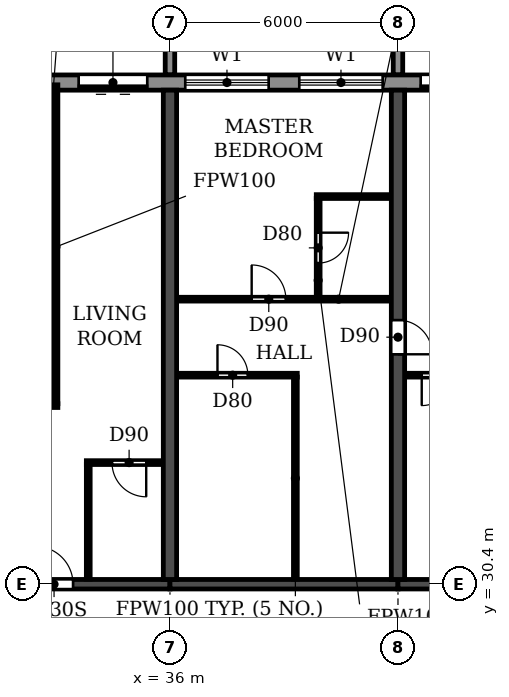
"""IFC4 building model, lengths in metres.
Left out: names, types, materials, properties, quantities, classifications, styles, units other than length and angle.
Written with IfcOpenShell. Run it as: python <this file> out.ifc"""

import sys

from ifc_helpers import new_model, si_unit, direction, frame, frame_2d, origin, place, context, subcontext, project, spatial, polyline, rectangle, outline, extrude, source, transform, mapped, element, fill, save


model = new_model("IFC4")
c1 = context("Model", 3, precision=1e-05, world=origin(), true_north=direction((0.0, 1.0)))
c2 = subcontext(c1, "Body", "Model", "MODEL_VIEW")
j1 = project(units=[si_unit("LENGTHUNIT", "METRE"), si_unit("PLANEANGLEUNIT", "RADIAN")], contexts=[c1])
p1 = place(None, origin())
s1 = spatial("IfcSite", under=j1, at=p1, CompositionType="ELEMENT")
p2 = place(p1, origin())
s2 = spatial("IfcBuilding", under=s1, at=p2, CompositionType="ELEMENT")
p3 = place(p2, frame((0.0, 0.0, 72.9)))
s3 = spatial("IfcBuildingStorey", under=s2, at=p3, CompositionType="ELEMENT", Elevation=72.9)
p4 = place(p3, frame((36.0, 30.525, 0.0), z_axis=(0.0, 0.0, 1.0), x_axis=(0.0, 1.0, 0.0)))
e1 = element("IfcWall", 1, at=p4, inside=s3, PredefinedType="SHEAR", context=c2, shape_type="SweptSolid", body=[
    extrude(rectangle(XDim=12.875, YDim=0.35, at=frame_2d((6.438, 0.0))), origin(), (0.0, 0.0, 1.0), 3.06),
])
p5 = place(p3, frame((42.0, 30.525, 0.0), z_axis=(0.0, 0.0, 1.0), x_axis=(0.0, 1.0, 0.0)))
e2 = element("IfcWall", 2, at=p5, inside=s3, PredefinedType="SHEAR", context=c2, shape_type="SweptSolid", body=[
    extrude(rectangle(XDim=12.875, YDim=0.35, at=frame_2d((6.438, 0.0))), origin(), (0.0, 0.0, 1.0), 3.06),
])
p6 = place(p5, frame((5.925, 0.0, 0.0)))
e3 = element("IfcOpeningElement", 3, at=p6, cuts=e2, PredefinedType="OPENING", context=c2, shape_type="SweptSolid", body=[
    extrude(rectangle(XDim=0.9, YDim=2.1, at=frame_2d((0.45, 1.05))), frame((0.0, 0.185, 0.0), z_axis=(0.0, -1.0, 0.0), x_axis=(1.0, 0.0, 0.0)), (0.0, 0.0, 1.0), 0.37),
])
p7 = place(p3, frame((30.0, 30.4, 0.0), z_axis=(0.0, 0.0, 1.0), x_axis=(1.0, 0.0, 0.0)))
e4 = element("IfcWall", 4, at=p7, inside=s3, PredefinedType="SHEAR", context=c2, shape_type="SweptSolid", body=[
    extrude(rectangle(XDim=6.0, YDim=0.25, at=frame_2d((3.0, 0.0))), origin(), (0.0, 0.0, 1.0), 2.46),
])
p8 = place(p7, frame((2.45, 0.0, 0.0)))
e5 = element("IfcOpeningElement", 5, at=p8, cuts=e4, PredefinedType="OPENING", context=c2, shape_type="SweptSolid", body=[
    extrude(rectangle(XDim=1.0, YDim=2.1, at=frame_2d((0.5, 1.05))), frame((0.0, 0.135, 0.0), z_axis=(0.0, -1.0, 0.0), x_axis=(1.0, 0.0, 0.0)), (0.0, 0.0, 1.0), 0.27),
])
p9 = place(p3, frame((36.0, 30.4, 0.0), z_axis=(0.0, 0.0, 1.0), x_axis=(1.0, 0.0, 0.0)))
e6 = element("IfcWall", 6, at=p9, inside=s3, PredefinedType="SHEAR", context=c2, shape_type="SweptSolid", body=[
    extrude(rectangle(XDim=6.0, YDim=0.25, at=frame_2d((3.0, 0.0))), origin(), (0.0, 0.0, 1.0), 2.46),
])
p10 = place(p3, frame((42.0, 30.4, 0.0), z_axis=(0.0, 0.0, 1.0), x_axis=(1.0, 0.0, 0.0)))
e7 = element("IfcWall", 7, at=p10, inside=s3, PredefinedType="SHEAR", context=c2, shape_type="SweptSolid", body=[
    extrude(rectangle(XDim=6.0, YDim=0.25, at=frame_2d((3.0, 0.0))), origin(), (0.0, 0.0, 1.0), 2.46),
])
p11 = place(p10, frame((2.45, 0.0, 0.0)))
e8 = element("IfcOpeningElement", 8, at=p11, cuts=e7, PredefinedType="OPENING", context=c2, shape_type="SweptSolid", body=[
    extrude(rectangle(XDim=1.0, YDim=2.1, at=frame_2d((0.5, 1.05))), frame((0.0, 0.135, 0.0), z_axis=(0.0, -1.0, 0.0), x_axis=(1.0, 0.0, 0.0)), (0.0, 0.0, 1.0), 0.27),
])
p12 = place(p3, frame((91.317, 43.6, 0.0), z_axis=(0.0, 0.0, 1.0), x_axis=(-1.0, 0.0, 0.0)))
e9 = element("IfcWall", 9, at=p12, inside=s3, PredefinedType="STANDARD", context=c2, shape_type="SweptSolid", body=[
    extrude(rectangle(XDim=80.634, YDim=0.4, at=frame_2d((40.317, 0.0))), origin(), (0.0, 0.0, 1.0), 3.06),
])
p13 = place(p12, frame((76.717, 0.0, 0.9)))
e10 = element("IfcOpeningElement", 10, at=p13, cuts=e9, PredefinedType="OPENING", context=c2, shape_type="SweptSolid", body=[
    extrude(rectangle(XDim=2.2, YDim=1.5, at=frame_2d((1.1, 0.75))), frame((0.0, 0.21, 0.0), z_axis=(0.0, -1.0, 0.0), x_axis=(1.0, 0.0, 0.0)), (0.0, 0.0, 1.0), 0.42),
])
p14 = place(p12, frame((73.917, 0.0, 0.0)))
e11 = element("IfcOpeningElement", 11, at=p14, cuts=e9, PredefinedType="OPENING", context=c2, shape_type="SweptSolid", body=[
    extrude(rectangle(XDim=1.8, YDim=2.4, at=frame_2d((0.9, 1.2))), frame((0.0, 0.21, 0.0), z_axis=(0.0, -1.0, 0.0), x_axis=(1.0, 0.0, 0.0)), (0.0, 0.0, 1.0), 0.42),
])
p15 = place(p12, frame((70.917, 0.0, 0.0)))
e12 = element("IfcOpeningElement", 12, at=p15, cuts=e9, PredefinedType="OPENING", context=c2, shape_type="SweptSolid", body=[
    extrude(rectangle(XDim=1.8, YDim=2.4, at=frame_2d((0.9, 1.2))), frame((0.0, 0.21, 0.0), z_axis=(0.0, -1.0, 0.0), x_axis=(1.0, 0.0, 0.0)), (0.0, 0.0, 1.0), 0.42),
])
p16 = place(p12, frame((67.717, 0.0, 0.9)))
e13 = element("IfcOpeningElement", 13, at=p16, cuts=e9, PredefinedType="OPENING", context=c2, shape_type="SweptSolid", body=[
    extrude(rectangle(XDim=2.2, YDim=1.5, at=frame_2d((1.1, 0.75))), frame((0.0, 0.21, 0.0), z_axis=(0.0, -1.0, 0.0), x_axis=(1.0, 0.0, 0.0)), (0.0, 0.0, 1.0), 0.42),
])
p17 = place(p12, frame((64.717, 0.0, 0.9)))
e14 = element("IfcOpeningElement", 14, at=p17, cuts=e9, PredefinedType="OPENING", context=c2, shape_type="SweptSolid", body=[
    extrude(rectangle(XDim=2.2, YDim=1.5, at=frame_2d((1.1, 0.75))), frame((0.0, 0.21, 0.0), z_axis=(0.0, -1.0, 0.0), x_axis=(1.0, 0.0, 0.0)), (0.0, 0.0, 1.0), 0.42),
])
p18 = place(p12, frame((61.917, 0.0, 0.0)))
e15 = element("IfcOpeningElement", 15, at=p18, cuts=e9, PredefinedType="OPENING", context=c2, shape_type="SweptSolid", body=[
    extrude(rectangle(XDim=1.8, YDim=2.4, at=frame_2d((0.9, 1.2))), frame((0.0, 0.21, 0.0), z_axis=(0.0, -1.0, 0.0), x_axis=(1.0, 0.0, 0.0)), (0.0, 0.0, 1.0), 0.42),
])
p19 = place(p12, frame((58.717, 0.0, 0.9)))
e16 = element("IfcOpeningElement", 16, at=p19, cuts=e9, PredefinedType="OPENING", context=c2, shape_type="SweptSolid", body=[
    extrude(rectangle(XDim=2.2, YDim=1.5, at=frame_2d((1.1, 0.75))), frame((0.0, 0.21, 0.0), z_axis=(0.0, -1.0, 0.0), x_axis=(1.0, 0.0, 0.0)), (0.0, 0.0, 1.0), 0.42),
])
p20 = place(p12, frame((55.917, 0.0, 0.0)))
e17 = element("IfcOpeningElement", 17, at=p20, cuts=e9, PredefinedType="OPENING", context=c2, shape_type="SweptSolid", body=[
    extrude(rectangle(XDim=1.8, YDim=2.4, at=frame_2d((0.9, 1.2))), frame((0.0, 0.21, 0.0), z_axis=(0.0, -1.0, 0.0), x_axis=(1.0, 0.0, 0.0)), (0.0, 0.0, 1.0), 0.42),
])
p21 = place(p12, frame((52.717, 0.0, 0.9)))
e18 = element("IfcOpeningElement", 18, at=p21, cuts=e9, PredefinedType="OPENING", context=c2, shape_type="SweptSolid", body=[
    extrude(rectangle(XDim=2.2, YDim=1.5, at=frame_2d((1.1, 0.75))), frame((0.0, 0.21, 0.0), z_axis=(0.0, -1.0, 0.0), x_axis=(1.0, 0.0, 0.0)), (0.0, 0.0, 1.0), 0.42),
])
p22 = place(p12, frame((49.717, 0.0, 0.9)))
e19 = element("IfcOpeningElement", 19, at=p22, cuts=e9, PredefinedType="OPENING", context=c2, shape_type="SweptSolid", body=[
    extrude(rectangle(XDim=2.2, YDim=1.5, at=frame_2d((1.1, 0.75))), frame((0.0, 0.21, 0.0), z_axis=(0.0, -1.0, 0.0), x_axis=(1.0, 0.0, 0.0)), (0.0, 0.0, 1.0), 0.42),
])
p23 = place(p12, frame((46.917, 0.0, 0.0)))
e20 = element("IfcOpeningElement", 20, at=p23, cuts=e9, PredefinedType="OPENING", context=c2, shape_type="SweptSolid", body=[
    extrude(rectangle(XDim=1.8, YDim=2.4, at=frame_2d((0.9, 1.2))), frame((0.0, 0.21, 0.0), z_axis=(0.0, -1.0, 0.0), x_axis=(1.0, 0.0, 0.0)), (0.0, 0.0, 1.0), 0.42),
])
p24 = place(p12, frame((43.717, 0.0, 0.9)))
e21 = element("IfcOpeningElement", 21, at=p24, cuts=e9, PredefinedType="OPENING", context=c2, shape_type="SweptSolid", body=[
    extrude(rectangle(XDim=2.2, YDim=1.5, at=frame_2d((1.1, 0.75))), frame((0.0, 0.21, 0.0), z_axis=(0.0, -1.0, 0.0), x_axis=(1.0, 0.0, 0.0)), (0.0, 0.0, 1.0), 0.42),
])
p25 = place(p12, frame((40.717, 0.0, 0.9)))
e22 = element("IfcOpeningElement", 22, at=p25, cuts=e9, PredefinedType="OPENING", context=c2, shape_type="SweptSolid", body=[
    extrude(rectangle(XDim=2.2, YDim=1.5, at=frame_2d((1.1, 0.75))), frame((0.0, 0.21, 0.0), z_axis=(0.0, -1.0, 0.0), x_axis=(1.0, 0.0, 0.0)), (0.0, 0.0, 1.0), 0.42),
])
p26 = place(p12, frame((37.917, 0.0, 0.0)))
e23 = element("IfcOpeningElement", 23, at=p26, cuts=e9, PredefinedType="OPENING", context=c2, shape_type="SweptSolid", body=[
    extrude(rectangle(XDim=1.8, YDim=2.4, at=frame_2d((0.9, 1.2))), frame((0.0, 0.21, 0.0), z_axis=(0.0, -1.0, 0.0), x_axis=(1.0, 0.0, 0.0)), (0.0, 0.0, 1.0), 0.42),
])
p27 = place(p12, frame((34.717, 0.0, 0.9)))
e24 = element("IfcOpeningElement", 24, at=p27, cuts=e9, PredefinedType="OPENING", context=c2, shape_type="SweptSolid", body=[
    extrude(rectangle(XDim=2.2, YDim=1.5, at=frame_2d((1.1, 0.75))), frame((0.0, 0.21, 0.0), z_axis=(0.0, -1.0, 0.0), x_axis=(1.0, 0.0, 0.0)), (0.0, 0.0, 1.0), 0.42),
])
p28 = place(p12, frame((31.917, 0.0, 0.0)))
e25 = element("IfcOpeningElement", 25, at=p28, cuts=e9, PredefinedType="OPENING", context=c2, shape_type="SweptSolid", body=[
    extrude(rectangle(XDim=1.8, YDim=2.4, at=frame_2d((0.9, 1.2))), frame((0.0, 0.21, 0.0), z_axis=(0.0, -1.0, 0.0), x_axis=(1.0, 0.0, 0.0)), (0.0, 0.0, 1.0), 0.42),
])
p29 = place(p12, frame((28.717, 0.0, 0.9)))
e26 = element("IfcOpeningElement", 26, at=p29, cuts=e9, PredefinedType="OPENING", context=c2, shape_type="SweptSolid", body=[
    extrude(rectangle(XDim=2.2, YDim=1.5, at=frame_2d((1.1, 0.75))), frame((0.0, 0.21, 0.0), z_axis=(0.0, -1.0, 0.0), x_axis=(1.0, 0.0, 0.0)), (0.0, 0.0, 1.0), 0.42),
])
p30 = place(p12, frame((25.717, 0.0, 0.9)))
e27 = element("IfcOpeningElement", 27, at=p30, cuts=e9, PredefinedType="OPENING", context=c2, shape_type="SweptSolid", body=[
    extrude(rectangle(XDim=2.2, YDim=1.5, at=frame_2d((1.1, 0.75))), frame((0.0, 0.21, 0.0), z_axis=(0.0, -1.0, 0.0), x_axis=(1.0, 0.0, 0.0)), (0.0, 0.0, 1.0), 0.42),
])
p31 = place(p12, frame((22.717, 0.0, 0.9)))
e28 = element("IfcOpeningElement", 28, at=p31, cuts=e9, PredefinedType="OPENING", context=c2, shape_type="SweptSolid", body=[
    extrude(rectangle(XDim=2.2, YDim=1.5, at=frame_2d((1.1, 0.75))), frame((0.0, 0.21, 0.0), z_axis=(0.0, -1.0, 0.0), x_axis=(1.0, 0.0, 0.0)), (0.0, 0.0, 1.0), 0.42),
])
p32 = place(p12, frame((19.917, 0.0, 0.0)))
e29 = element("IfcOpeningElement", 29, at=p32, cuts=e9, PredefinedType="OPENING", context=c2, shape_type="SweptSolid", body=[
    extrude(rectangle(XDim=1.8, YDim=2.4, at=frame_2d((0.9, 1.2))), frame((0.0, 0.21, 0.0), z_axis=(0.0, -1.0, 0.0), x_axis=(1.0, 0.0, 0.0)), (0.0, 0.0, 1.0), 0.42),
])
p33 = place(p12, frame((16.717, 0.0, 0.9)))
e30 = element("IfcOpeningElement", 30, at=p33, cuts=e9, PredefinedType="OPENING", context=c2, shape_type="SweptSolid", body=[
    extrude(rectangle(XDim=2.2, YDim=1.5, at=frame_2d((1.1, 0.75))), frame((0.0, 0.21, 0.0), z_axis=(0.0, -1.0, 0.0), x_axis=(1.0, 0.0, 0.0)), (0.0, 0.0, 1.0), 0.42),
])
p34 = place(p12, frame((13.717, 0.0, 0.9)))
e31 = element("IfcOpeningElement", 31, at=p34, cuts=e9, PredefinedType="OPENING", context=c2, shape_type="SweptSolid", body=[
    extrude(rectangle(XDim=2.2, YDim=1.5, at=frame_2d((1.1, 0.75))), frame((0.0, 0.21, 0.0), z_axis=(0.0, -1.0, 0.0), x_axis=(1.0, 0.0, 0.0)), (0.0, 0.0, 1.0), 0.42),
])
p35 = place(p12, frame((10.717, 0.0, 0.9)))
e32 = element("IfcOpeningElement", 32, at=p35, cuts=e9, PredefinedType="OPENING", context=c2, shape_type="SweptSolid", body=[
    extrude(rectangle(XDim=2.2, YDim=1.5, at=frame_2d((1.1, 0.75))), frame((0.0, 0.21, 0.0), z_axis=(0.0, -1.0, 0.0), x_axis=(1.0, 0.0, 0.0)), (0.0, 0.0, 1.0), 0.42),
])
p36 = place(p12, frame((7.917, 0.0, 0.0)))
e33 = element("IfcOpeningElement", 33, at=p36, cuts=e9, PredefinedType="OPENING", context=c2, shape_type="SweptSolid", body=[
    extrude(rectangle(XDim=1.8, YDim=2.4, at=frame_2d((0.9, 1.2))), frame((0.0, 0.21, 0.0), z_axis=(0.0, -1.0, 0.0), x_axis=(1.0, 0.0, 0.0)), (0.0, 0.0, 1.0), 0.42),
])
p37 = place(p12, frame((4.717, 0.0, 0.9)))
e34 = element("IfcOpeningElement", 34, at=p37, cuts=e9, PredefinedType="OPENING", context=c2, shape_type="SweptSolid", body=[
    extrude(rectangle(XDim=2.2, YDim=1.5, at=frame_2d((1.1, 0.75))), frame((0.0, 0.21, 0.0), z_axis=(0.0, -1.0, 0.0), x_axis=(1.0, 0.0, 0.0)), (0.0, 0.0, 1.0), 0.42),
])
p38 = place(p12, frame((1.917, 0.0, 0.0)))
e35 = element("IfcOpeningElement", 35, at=p38, cuts=e9, PredefinedType="OPENING", context=c2, shape_type="SweptSolid", body=[
    extrude(rectangle(XDim=1.8, YDim=2.4, at=frame_2d((0.9, 1.2))), frame((0.0, 0.21, 0.0), z_axis=(0.0, -1.0, 0.0), x_axis=(1.0, 0.0, 0.0)), (0.0, 0.0, 1.0), 0.42),
])
m1 = source(origin(), c2, "Body", "SweptSolid", [
    extrude(outline(polyline([(0.0, 0.0), (0.25, 0.0), (0.25, 3.1), (0.0, 3.1), (0.0, 0.0)])), origin(), (0.0, 0.0, 1.0), 3.1),
])
for number, where in (
    (36, (35.875, 43.8, 0.0)),
    (37, (41.875, 43.8, 0.0)),
):
    element("IfcWall", number, at=place(p3, frame(where)), inside=s3, PredefinedType="STANDARD", context=c2, shape_type="MappedRepresentation", body=[
        mapped(m1, transform((0.0, 0.0, 0.0))),
    ])
p39 = place(p3, frame((33.8, 33.6, 0.0), z_axis=(0.0, 0.0, 1.0), x_axis=(1.0, 0.0, 0.0)))
e38 = element("IfcWall", 38, at=p39, inside=s3, PredefinedType="PARTITIONING", context=c2, shape_type="SweptSolid", body=[
    extrude(rectangle(XDim=2.015, YDim=0.1, at=frame_2d((1.007, 0.0))), origin(), (0.0, 0.0, 1.0), 3.06),
])
p40 = place(p39, frame((0.675, 0.0, 0.0)))
e39 = element("IfcOpeningElement", 39, at=p40, cuts=e38, PredefinedType="OPENING", context=c2, shape_type="SweptSolid", body=[
    extrude(rectangle(XDim=0.9, YDim=2.1, at=frame_2d((0.45, 1.05))), frame((0.0, 0.06, 0.0), z_axis=(0.0, -1.0, 0.0), x_axis=(1.0, 0.0, 0.0)), (0.0, 0.0, 1.0), 0.12),
])
p41 = place(p3, frame((30.185, 35.1, 0.0), z_axis=(0.0, 0.0, 1.0), x_axis=(1.0, 0.0, 0.0)))
e40 = element("IfcWall", 40, at=p41, inside=s3, PredefinedType="PARTITIONING", context=c2, shape_type="SweptSolid", body=[
    extrude(rectangle(XDim=2.865, YDim=0.1, at=frame_2d((1.433, 0.0))), origin(), (0.0, 0.0, 1.0), 3.06),
])
p42 = place(p41, frame((0.315, 0.0, 0.0)))
e41 = element("IfcOpeningElement", 41, at=p42, cuts=e40, PredefinedType="OPENING", context=c2, shape_type="SweptSolid", body=[
    extrude(rectangle(XDim=0.9, YDim=2.1, at=frame_2d((0.45, 1.05))), frame((0.0, 0.06, 0.0), z_axis=(0.0, -1.0, 0.0), x_axis=(1.0, 0.0, 0.0)), (0.0, 0.0, 1.0), 0.12),
])
p43 = place(p3, frame((36.185, 35.9, 0.0), z_axis=(0.0, 0.0, 1.0), x_axis=(1.0, 0.0, 0.0)))
e42 = element("IfcWall", 42, at=p43, inside=s3, PredefinedType="PARTITIONING", context=c2, shape_type="SweptSolid", body=[
    extrude(rectangle(XDim=3.165, YDim=0.1, at=frame_2d((1.583, 0.0))), origin(), (0.0, 0.0, 1.0), 3.06),
])
p44 = place(p43, frame((1.065, 0.0, 0.0)))
e43 = element("IfcOpeningElement", 43, at=p44, cuts=e42, PredefinedType="OPENING", context=c2, shape_type="SweptSolid", body=[
    extrude(rectangle(XDim=0.8, YDim=2.1, at=frame_2d((0.4, 1.05))), frame((0.0, 0.06, 0.0), z_axis=(0.0, -1.0, 0.0), x_axis=(1.0, 0.0, 0.0)), (0.0, 0.0, 1.0), 0.12),
])
p45 = place(p3, frame((42.185, 35.9, 0.0), z_axis=(0.0, 0.0, 1.0), x_axis=(1.0, 0.0, 0.0)))
e44 = element("IfcWall", 44, at=p45, inside=s3, PredefinedType="PARTITIONING", context=c2, shape_type="SweptSolid", body=[
    extrude(rectangle(XDim=1.915, YDim=0.1, at=frame_2d((0.958, 0.0))), origin(), (0.0, 0.0, 1.0), 3.06),
])
p46 = place(p45, frame((0.44, 0.0, 0.0)))
e45 = element("IfcOpeningElement", 45, at=p46, cuts=e44, PredefinedType="OPENING", context=c2, shape_type="SweptSolid", body=[
    extrude(rectangle(XDim=0.8, YDim=2.1, at=frame_2d((0.4, 1.05))), frame((0.0, 0.06, 0.0), z_axis=(0.0, -1.0, 0.0), x_axis=(1.0, 0.0, 0.0)), (0.0, 0.0, 1.0), 0.12),
])
p47 = place(p3, frame((36.185, 37.9, 0.0), z_axis=(0.0, 0.0, 1.0), x_axis=(1.0, 0.0, 0.0)))
e46 = element("IfcWall", 46, at=p47, inside=s3, PredefinedType="PARTITIONING", context=c2, shape_type="SweptSolid", body=[
    extrude(rectangle(XDim=5.63, YDim=0.1, at=frame_2d((2.815, 0.0))), origin(), (0.0, 0.0, 1.0), 3.06),
])
p48 = place(p47, frame((1.965, 0.0, 0.0)))
e47 = element("IfcOpeningElement", 47, at=p48, cuts=e46, PredefinedType="OPENING", context=c2, shape_type="SweptSolid", body=[
    extrude(rectangle(XDim=0.9, YDim=2.1, at=frame_2d((0.45, 1.05))), frame((0.0, 0.06, 0.0), z_axis=(0.0, -1.0, 0.0), x_axis=(1.0, 0.0, 0.0)), (0.0, 0.0, 1.0), 0.12),
])
p49 = place(p3, frame((39.85, 40.6, 0.0), z_axis=(0.0, 0.0, 1.0), x_axis=(1.0, 0.0, 0.0)))
e48 = element("IfcWall", 48, at=p49, inside=s3, PredefinedType="PARTITIONING", context=c2, shape_type="SweptSolid", body=[
    extrude(rectangle(XDim=1.965, YDim=0.1, at=frame_2d((0.982, 0.0))), origin(), (0.0, 0.0, 1.0), 3.06),
])
p50 = place(p3, frame((33.0, 35.15, 0.0), z_axis=(0.0, 0.0, 1.0), x_axis=(0.0, 1.0, 0.0)))
e49 = element("IfcWall", 49, at=p50, inside=s3, PredefinedType="PARTITIONING", context=c2, shape_type="SweptSolid", body=[
    extrude(rectangle(XDim=8.39, YDim=0.1, at=frame_2d((4.195, 0.0))), origin(), (0.0, 0.0, 1.0), 3.06),
])
p51 = place(p3, frame((33.85, 30.535, 0.0), z_axis=(0.0, 0.0, 1.0), x_axis=(0.0, 1.0, 0.0)))
e50 = element("IfcWall", 50, at=p51, inside=s3, PredefinedType="PARTITIONING", context=c2, shape_type="SweptSolid", body=[
    extrude(rectangle(XDim=3.015, YDim=0.1, at=frame_2d((1.508, 0.0))), origin(), (0.0, 0.0, 1.0), 3.06),
])
p52 = place(p3, frame((39.3, 30.535, 0.0), z_axis=(0.0, 0.0, 1.0), x_axis=(0.0, 1.0, 0.0)))
e51 = element("IfcWall", 51, at=p52, inside=s3, PredefinedType="PARTITIONING", context=c2, shape_type="SweptSolid", body=[
    extrude(rectangle(XDim=5.315, YDim=0.1, at=frame_2d((2.658, 0.0))), origin(), (0.0, 0.0, 1.0), 3.06),
])
p53 = place(p3, frame((39.9, 37.95, 0.0), z_axis=(0.0, 0.0, 1.0), x_axis=(0.0, 1.0, 0.0)))
e52 = element("IfcWall", 52, at=p53, inside=s3, PredefinedType="PARTITIONING", context=c2, shape_type="SweptSolid", body=[
    extrude(rectangle(XDim=2.6, YDim=0.1, at=frame_2d((1.3, 0.0))), origin(), (0.0, 0.0, 1.0), 3.06),
])
p54 = place(p53, frame((0.9, 0.0, 0.0)))
e53 = element("IfcOpeningElement", 53, at=p54, cuts=e52, PredefinedType="OPENING", context=c2, shape_type="SweptSolid", body=[
    extrude(rectangle(XDim=0.8, YDim=2.1, at=frame_2d((0.4, 1.05))), frame((0.0, 0.06, 0.0), z_axis=(0.0, -1.0, 0.0), x_axis=(1.0, 0.0, 0.0)), (0.0, 0.0, 1.0), 0.12),
])
p55 = place(p20, origin())
e54 = element("IfcDoor", 54, at=p55, inside=s3, OperationType="DOUBLE_DOOR_SLIDING", PredefinedType="DOOR", context=c2, shape_type="SweptSolid", body=[
    extrude(rectangle(XDim=1.8, YDim=2.4, at=frame_2d((0.9, 1.2))), frame((0.0, 0.025, 0.0), z_axis=(0.0, -1.0, 0.0), x_axis=(1.0, 0.0, 0.0)), (0.0, 0.0, 1.0), 0.05),
])
fill(e17, e54)
p56 = place(p21, origin())
e55 = element("IfcWindow", 55, at=p56, inside=s3, PartitioningType="DOUBLE_PANEL_HORIZONTAL", PredefinedType="WINDOW", context=c2, shape_type="SweptSolid", body=[
    extrude(rectangle(XDim=2.2, YDim=1.5, at=frame_2d((1.1, 0.75))), frame((0.0, 0.03, 0.0), z_axis=(0.0, -1.0, 0.0), x_axis=(1.0, 0.0, 0.0)), (0.0, 0.0, 1.0), 0.06),
])
fill(e18, e55)
p57 = place(p22, origin())
e56 = element("IfcWindow", 56, at=p57, inside=s3, PartitioningType="DOUBLE_PANEL_HORIZONTAL", PredefinedType="WINDOW", context=c2, shape_type="SweptSolid", body=[
    extrude(rectangle(XDim=2.2, YDim=1.5, at=frame_2d((1.1, 0.75))), frame((0.0, 0.03, 0.0), z_axis=(0.0, -1.0, 0.0), x_axis=(1.0, 0.0, 0.0)), (0.0, 0.0, 1.0), 0.06),
])
fill(e19, e56)
p58 = place(p23, origin())
e57 = element("IfcDoor", 57, at=p58, inside=s3, OperationType="DOUBLE_DOOR_SLIDING", PredefinedType="DOOR", context=c2, shape_type="SweptSolid", body=[
    extrude(rectangle(XDim=1.8, YDim=2.4, at=frame_2d((0.9, 1.2))), frame((0.0, 0.025, 0.0), z_axis=(0.0, -1.0, 0.0), x_axis=(1.0, 0.0, 0.0)), (0.0, 0.0, 1.0), 0.05),
])
fill(e20, e57)
p59 = place(p8, origin())
e58 = element("IfcDoor", 58, at=p59, inside=s3, OperationType="SINGLE_SWING_LEFT", PredefinedType="DOOR", context=c2, shape_type="SweptSolid", body=[
    extrude(rectangle(XDim=1.0, YDim=2.1, at=frame_2d((0.5, 1.05))), frame((0.0, 0.025, 0.0), z_axis=(0.0, -1.0, 0.0), x_axis=(1.0, 0.0, 0.0)), (0.0, 0.0, 1.0), 0.05),
])
fill(e5, e58)
p60 = place(p40, frame((0.9, 0.0, 0.0), z_axis=(0.0, 0.0, 1.0), x_axis=(-1.0, 0.0, 0.0)))
e59 = element("IfcDoor", 59, at=p60, inside=s3, OperationType="SINGLE_SWING_LEFT", PredefinedType="DOOR", context=c2, shape_type="SweptSolid", body=[
    extrude(rectangle(XDim=0.9, YDim=2.1, at=frame_2d((0.45, 1.05))), frame((0.0, 0.025, 0.0), z_axis=(0.0, -1.0, 0.0), x_axis=(1.0, 0.0, 0.0)), (0.0, 0.0, 1.0), 0.05),
])
fill(e39, e59)
p61 = place(p44, origin())
e60 = element("IfcDoor", 60, at=p61, inside=s3, OperationType="SINGLE_SWING_LEFT", PredefinedType="DOOR", context=c2, shape_type="SweptSolid", body=[
    extrude(rectangle(XDim=0.8, YDim=2.1, at=frame_2d((0.4, 1.05))), frame((0.0, 0.025, 0.0), z_axis=(0.0, -1.0, 0.0), x_axis=(1.0, 0.0, 0.0)), (0.0, 0.0, 1.0), 0.05),
])
fill(e43, e60)
p62 = place(p48, origin())
e61 = element("IfcDoor", 61, at=p62, inside=s3, OperationType="SINGLE_SWING_LEFT", PredefinedType="DOOR", context=c2, shape_type="SweptSolid", body=[
    extrude(rectangle(XDim=0.9, YDim=2.1, at=frame_2d((0.45, 1.05))), frame((0.0, 0.025, 0.0), z_axis=(0.0, -1.0, 0.0), x_axis=(1.0, 0.0, 0.0)), (0.0, 0.0, 1.0), 0.05),
])
fill(e47, e61)
p63 = place(p6, frame((0.9, 0.0, 0.0), z_axis=(0.0, 0.0, 1.0), x_axis=(-1.0, 0.0, 0.0)))
e62 = element("IfcDoor", 62, at=p63, inside=s3, OperationType="SINGLE_SWING_RIGHT", PredefinedType="DOOR", context=c2, shape_type="SweptSolid", body=[
    extrude(rectangle(XDim=0.9, YDim=2.1, at=frame_2d((0.45, 1.05))), frame((0.0, 0.025, 0.0), z_axis=(0.0, -1.0, 0.0), x_axis=(1.0, 0.0, 0.0)), (0.0, 0.0, 1.0), 0.05),
])
fill(e3, e62)
p64 = place(p46, frame((0.8, 0.0, 0.0), z_axis=(0.0, 0.0, 1.0), x_axis=(-1.0, 0.0, 0.0)))
e63 = element("IfcDoor", 63, at=p64, inside=s3, OperationType="SINGLE_SWING_RIGHT", PredefinedType="DOOR", context=c2, shape_type="SweptSolid", body=[
    extrude(rectangle(XDim=0.8, YDim=2.1, at=frame_2d((0.4, 1.05))), frame((0.0, 0.025, 0.0), z_axis=(0.0, -1.0, 0.0), x_axis=(1.0, 0.0, 0.0)), (0.0, 0.0, 1.0), 0.05),
])
fill(e45, e63)
p65 = place(p54, frame((0.8, 0.0, 0.0), z_axis=(0.0, 0.0, 1.0), x_axis=(-1.0, 0.0, 0.0)))
e64 = element("IfcDoor", 64, at=p65, inside=s3, OperationType="SINGLE_SWING_LEFT", PredefinedType="DOOR", context=c2, shape_type="SweptSolid", body=[
    extrude(rectangle(XDim=0.8, YDim=2.1, at=frame_2d((0.4, 1.05))), frame((0.0, 0.025, 0.0), z_axis=(0.0, -1.0, 0.0), x_axis=(1.0, 0.0, 0.0)), (0.0, 0.0, 1.0), 0.05),
])
fill(e53, e64)
save(model, sys.argv[1])
